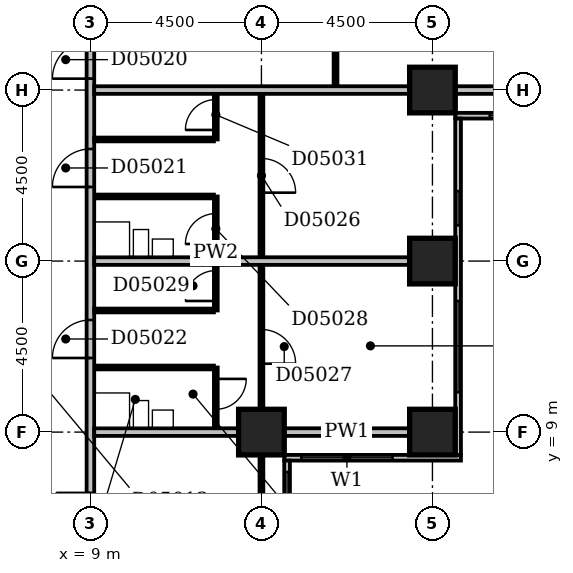
"""IFC4 building model, lengths in metres.
Left out: names, types, materials, properties, quantities, classifications, styles, units other than length and angle.
Written with IfcOpenShell. Run it as: python <this file> out.ifc"""

import sys

from ifc_helpers import new_model, si_unit, direction, frame, frame_2d, origin, origin_2d, place, context, subcontext, project, spatial, rectangle, extrude, element, fill, save


model = new_model("IFC4")
c1 = context("Model", 3, precision=1e-05, world=origin(), true_north=direction((0.0, 1.0)))
c2 = subcontext(c1, "Body", "Model", "MODEL_VIEW")
j1 = project(units=[si_unit("LENGTHUNIT", "METRE"), si_unit("PLANEANGLEUNIT", "RADIAN")], contexts=[c1])
p1 = place(None, origin())
s1 = spatial("IfcSite", under=j1, at=p1, CompositionType="ELEMENT")
p2 = place(p1, origin())
s2 = spatial("IfcBuilding", under=s1, at=p2, CompositionType="ELEMENT")
p3 = place(p2, frame((0.0, 0.0, 29.0)))
s3 = spatial("IfcBuildingStorey", under=s2, at=p3, CompositionType="ELEMENT", Elevation=29.0)
for number, where, z_axis, x_axis in (
    (1, (13.5, 9.0, -0.3), (0.0, 0.0, 1.0), (1.0, 0.0, 0.0)),
    (2, (18.0, 9.0, -0.3), (0.0, 0.0, 1.0), (1.0, 0.0, 0.0)),
    (3, (18.0, 13.5, -0.3), (0.0, 0.0, 1.0), (1.0, 0.0, 0.0)),
    (4, (18.0, 18.0, -0.3), (0.0, 0.0, 1.0), (1.0, 0.0, 0.0)),
):
    element("IfcColumn", number, at=place(p3, frame(where, z_axis=z_axis, x_axis=x_axis)), inside=s3, PredefinedType="COLUMN", context=c2, shape_type="SweptSolid", body=[
        extrude(rectangle(XDim=1.2, YDim=1.2, at=origin_2d()), origin(), (0.0, 0.0, 1.0), 3.6),
    ])
p4 = place(p3, frame((14.175, 3.9, 0.0), z_axis=(0.0, 0.0, 1.0), x_axis=(0.0, 1.0, 0.0)))
e5 = element("IfcWall", 5, at=p4, inside=s3, PredefinedType="STANDARD", context=c2, shape_type="SweptSolid", body=[
    extrude(rectangle(XDim=4.35, YDim=0.15, at=frame_2d((2.175, 0.0))), origin(), (0.0, 0.0, 1.0), 2.7),
])
p5 = place(p4, frame((1.65, 0.0, 0.6)))
e6 = element("IfcOpeningElement", 6, at=p5, cuts=e5, PredefinedType="OPENING", context=c2, shape_type="SweptSolid", body=[
    extrude(rectangle(XDim=2.4, YDim=1.8, at=frame_2d((1.2, 0.9))), frame((0.0, 0.087, 0.0), z_axis=(0.0, -1.0, 0.0), x_axis=(1.0, 0.0, 0.0)), (0.0, 0.0, 1.0), 0.174),
])
p6 = place(p3, frame((14.1, 8.325, 0.0), z_axis=(0.0, 0.0, 1.0), x_axis=(1.0, 0.0, 0.0)))
e7 = element("IfcWall", 7, at=p6, inside=s3, PredefinedType="STANDARD", context=c2, shape_type="SweptSolid", body=[
    extrude(rectangle(XDim=4.65, YDim=0.15, at=frame_2d((2.325, 0.0))), origin(), (0.0, 0.0, 1.0), 2.7),
])
p7 = place(p6, frame((0.45, 0.0, 0.6)))
e8 = element("IfcOpeningElement", 8, at=p7, cuts=e7, PredefinedType="OPENING", context=c2, shape_type="SweptSolid", body=[
    extrude(rectangle(XDim=2.4, YDim=1.8, at=frame_2d((1.2, 0.9))), frame((0.0, 0.087, 0.0), z_axis=(0.0, -1.0, 0.0), x_axis=(1.0, 0.0, 0.0)), (0.0, 0.0, 1.0), 0.174),
])
p8 = place(p3, frame((18.675, 8.4, 0.0), z_axis=(0.0, 0.0, 1.0), x_axis=(0.0, 1.0, 0.0)))
e9 = element("IfcWall", 9, at=p8, inside=s3, PredefinedType="STANDARD", context=c2, shape_type="SweptSolid", body=[
    extrude(rectangle(XDim=8.85, YDim=0.15, at=frame_2d((4.425, 0.0))), origin(), (0.0, 0.0, 1.0), 2.7),
])
p9 = place(p8, frame((1.65, 0.0, 0.6)))
e10 = element("IfcOpeningElement", 10, at=p9, cuts=e9, PredefinedType="OPENING", context=c2, shape_type="SweptSolid", body=[
    extrude(rectangle(XDim=2.4, YDim=1.8, at=frame_2d((1.2, 0.9))), frame((0.0, 0.087, 0.0), z_axis=(0.0, -1.0, 0.0), x_axis=(1.0, 0.0, 0.0)), (0.0, 0.0, 1.0), 0.174),
])
p10 = place(p8, frame((6.04, 0.0, 0.6)))
e11 = element("IfcOpeningElement", 11, at=p10, cuts=e9, PredefinedType="OPENING", context=c2, shape_type="SweptSolid", body=[
    extrude(rectangle(XDim=0.9, YDim=1.8, at=frame_2d((0.45, 0.9))), frame((0.0, 0.087, 0.0), z_axis=(0.0, -1.0, 0.0), x_axis=(1.0, 0.0, 0.0)), (0.0, 0.0, 1.0), 0.174),
])
p11 = place(p3, frame((18.6, 17.325, 0.0), z_axis=(0.0, 0.0, 1.0), x_axis=(1.0, 0.0, 0.0)))
e12 = element("IfcWall", 12, at=p11, inside=s3, PredefinedType="STANDARD", context=c2, shape_type="SweptSolid", body=[
    extrude(rectangle(XDim=4.65, YDim=0.15, at=frame_2d((2.325, 0.0))), origin(), (0.0, 0.0, 1.0), 2.7),
])
p12 = place(p11, frame((0.907, 0.0, 0.6)))
e13 = element("IfcOpeningElement", 13, at=p12, cuts=e12, PredefinedType="OPENING", context=c2, shape_type="SweptSolid", body=[
    extrude(rectangle(XDim=2.1, YDim=1.8, at=frame_2d((1.05, 0.9))), frame((0.0, 0.087, 0.0), z_axis=(0.0, -1.0, 0.0), x_axis=(1.0, 0.0, 0.0)), (0.0, 0.0, 1.0), 0.174),
])
p13 = place(p3, frame((9.0, 5.0, 0.0), z_axis=(0.0, 0.0, 1.0), x_axis=(0.0, 1.0, 0.0)))
e14 = element("IfcWall", 14, at=p13, inside=s3, PredefinedType="PARTITIONING", context=c2, shape_type="SweptSolid", body=[
    extrude(rectangle(XDim=44.5, YDim=0.2, at=frame_2d((22.25, 0.0))), origin(), (0.0, 0.0, 1.0), 3.3),
])
p14 = place(p13, frame((24.7, 0.0, 0.0)))
e15 = element("IfcOpeningElement", 15, at=p14, cuts=e14, PredefinedType="OPENING", context=c2, shape_type="SweptSolid", body=[
    extrude(rectangle(XDim=1.0, YDim=2.1, at=frame_2d((0.5, 1.05))), frame((0.0, 0.112, 0.0), z_axis=(0.0, -1.0, 0.0), x_axis=(1.0, 0.0, 0.0)), (0.0, 0.0, 1.0), 0.224),
])
p15 = place(p13, frame((13.3, 0.0, 0.0)))
e16 = element("IfcOpeningElement", 16, at=p15, cuts=e14, PredefinedType="OPENING", context=c2, shape_type="SweptSolid", body=[
    extrude(rectangle(XDim=1.0, YDim=2.1, at=frame_2d((0.5, 1.05))), frame((0.0, 0.112, 0.0), z_axis=(0.0, -1.0, 0.0), x_axis=(1.0, 0.0, 0.0)), (0.0, 0.0, 1.0), 0.224),
])
p16 = place(p13, frame((10.45, 0.0, 0.0)))
e17 = element("IfcOpeningElement", 17, at=p16, cuts=e14, PredefinedType="OPENING", context=c2, shape_type="SweptSolid", body=[
    extrude(rectangle(XDim=1.0, YDim=2.1, at=frame_2d((0.5, 1.05))), frame((0.0, 0.112, 0.0), z_axis=(0.0, -1.0, 0.0), x_axis=(1.0, 0.0, 0.0)), (0.0, 0.0, 1.0), 0.224),
])
p17 = place(p13, frame((5.95, 0.0, 0.0)))
e18 = element("IfcOpeningElement", 18, at=p17, cuts=e14, PredefinedType="OPENING", context=c2, shape_type="SweptSolid", body=[
    extrude(rectangle(XDim=1.0, YDim=2.1, at=frame_2d((0.5, 1.05))), frame((0.0, 0.112, 0.0), z_axis=(0.0, -1.0, 0.0), x_axis=(1.0, 0.0, 0.0)), (0.0, 0.0, 1.0), 0.224),
])
p18 = place(p13, frame((37.25, 0.0, 0.0)))
e19 = element("IfcOpeningElement", 19, at=p18, cuts=e14, PredefinedType="OPENING", context=c2, shape_type="SweptSolid", body=[
    extrude(rectangle(XDim=0.9, YDim=2.1, at=frame_2d((0.45, 1.05))), frame((0.0, 0.112, 0.0), z_axis=(0.0, -1.0, 0.0), x_axis=(1.0, 0.0, 0.0)), (0.0, 0.0, 1.0), 0.224),
])
p19 = place(p13, frame((1.5, 0.0, 0.0)))
e20 = element("IfcOpeningElement", 20, at=p19, cuts=e14, PredefinedType="OPENING", context=c2, shape_type="SweptSolid", body=[
    extrude(rectangle(XDim=0.9, YDim=2.1, at=frame_2d((0.45, 1.05))), frame((0.0, 0.112, 0.0), z_axis=(0.0, -1.0, 0.0), x_axis=(1.0, 0.0, 0.0)), (0.0, 0.0, 1.0), 0.224),
])
p20 = place(p3, frame((13.5, 5.1, 0.0), z_axis=(0.0, 0.0, 1.0), x_axis=(0.0, 1.0, 0.0)))
e21 = element("IfcWall", 21, at=p20, inside=s3, PredefinedType="PARTITIONING", context=c2, shape_type="SweptSolid", body=[
    extrude(rectangle(XDim=3.3, YDim=0.1, at=frame_2d((1.65, 0.0))), origin(), (0.0, 0.0, 1.0), 2.7),
])
p21 = place(p3, frame((9.1, 9.0, 0.0), z_axis=(0.0, 0.0, 1.0), x_axis=(1.0, 0.0, 0.0)))
e22 = element("IfcWall", 22, at=p21, inside=s3, PredefinedType="PARTITIONING", context=c2, shape_type="SweptSolid", body=[
    extrude(rectangle(XDim=3.8, YDim=0.2, at=frame_2d((1.9, 0.0))), origin(), (0.0, 0.0, 1.0), 3.3),
])
p22 = place(p3, frame((14.1, 9.0, 0.0), z_axis=(0.0, 0.0, 1.0), x_axis=(1.0, 0.0, 0.0)))
e23 = element("IfcWall", 23, at=p22, inside=s3, PredefinedType="PARTITIONING", context=c2, shape_type="SweptSolid", body=[
    extrude(rectangle(XDim=3.3, YDim=0.2, at=frame_2d((1.65, 0.0))), origin(), (0.0, 0.0, 1.0), 2.7),
])
p23 = place(p3, frame((12.3, 9.1, 0.0), z_axis=(0.0, 0.0, 1.0), x_axis=(0.0, 1.0, 0.0)))
e24 = element("IfcWall", 24, at=p23, inside=s3, PredefinedType="PARTITIONING", context=c2, shape_type="SweptSolid", body=[
    extrude(rectangle(XDim=1.6, YDim=0.1, at=frame_2d((0.8, 0.0))), origin(), (0.0, 0.0, 1.0), 3.3),
])
p24 = place(p23, frame((0.5, 0.0, 0.0)))
e25 = element("IfcOpeningElement", 25, at=p24, cuts=e24, PredefinedType="OPENING", context=c2, shape_type="SweptSolid", body=[
    extrude(rectangle(XDim=0.8, YDim=2.1, at=frame_2d((0.4, 1.05))), frame((0.0, 0.062, 0.0), z_axis=(0.0, -1.0, 0.0), x_axis=(1.0, 0.0, 0.0)), (0.0, 0.0, 1.0), 0.124),
])
p25 = place(p3, frame((13.5, 9.6, 0.0), z_axis=(0.0, 0.0, 1.0), x_axis=(0.0, 1.0, 0.0)))
e26 = element("IfcWall", 26, at=p25, inside=s3, PredefinedType="PARTITIONING", context=c2, shape_type="SweptSolid", body=[
    extrude(rectangle(XDim=8.3, YDim=0.1, at=frame_2d((4.15, 0.0))), origin(), (0.0, 0.0, 1.0), 3.3),
])
p26 = place(p25, frame((5.7, 0.0, 0.0)))
e27 = element("IfcOpeningElement", 27, at=p26, cuts=e26, PredefinedType="OPENING", context=c2, shape_type="SweptSolid", body=[
    extrude(rectangle(XDim=0.9, YDim=2.1, at=frame_2d((0.45, 1.05))), frame((0.0, 0.062, 0.0), z_axis=(0.0, -1.0, 0.0), x_axis=(1.0, 0.0, 0.0)), (0.0, 0.0, 1.0), 0.124),
])
p27 = place(p25, frame((1.2, 0.0, 0.0)))
e28 = element("IfcOpeningElement", 28, at=p27, cuts=e26, PredefinedType="OPENING", context=c2, shape_type="SweptSolid", body=[
    extrude(rectangle(XDim=0.9, YDim=2.1, at=frame_2d((0.45, 1.05))), frame((0.0, 0.062, 0.0), z_axis=(0.0, -1.0, 0.0), x_axis=(1.0, 0.0, 0.0)), (0.0, 0.0, 1.0), 0.124),
])
p28 = place(p3, frame((9.1, 10.7, 0.0), z_axis=(0.0, 0.0, 1.0), x_axis=(1.0, 0.0, 0.0)))
e29 = element("IfcWall", 29, at=p28, inside=s3, PredefinedType="PLUMBINGWALL", context=c2, shape_type="SweptSolid", body=[
    extrude(rectangle(XDim=3.15, YDim=0.1, at=frame_2d((1.575, 0.0))), origin(), (0.0, 0.0, 1.0), 3.3),
])
p29 = place(p3, frame((9.1, 12.2, 0.0), z_axis=(0.0, 0.0, 1.0), x_axis=(1.0, 0.0, 0.0)))
e30 = element("IfcWall", 30, at=p29, inside=s3, PredefinedType="PARTITIONING", context=c2, shape_type="SweptSolid", body=[
    extrude(rectangle(XDim=3.15, YDim=0.1, at=frame_2d((1.575, 0.0))), origin(), (0.0, 0.0, 1.0), 3.3),
])
p30 = place(p3, frame((12.3, 12.2, 0.0), z_axis=(0.0, 0.0, 1.0), x_axis=(0.0, 1.0, 0.0)))
e31 = element("IfcWall", 31, at=p30, inside=s3, PredefinedType="PARTITIONING", context=c2, shape_type="SweptSolid", body=[
    extrude(rectangle(XDim=3.0, YDim=0.1, at=frame_2d((1.5, 0.0))), origin(), (0.0, 0.0, 1.0), 3.3),
])
p31 = place(p30, frame((1.75, 0.0, 0.0)))
e32 = element("IfcOpeningElement", 32, at=p31, cuts=e31, PredefinedType="OPENING", context=c2, shape_type="SweptSolid", body=[
    extrude(rectangle(XDim=0.8, YDim=2.1, at=frame_2d((0.4, 1.05))), frame((0.0, 0.062, 0.0), z_axis=(0.0, -1.0, 0.0), x_axis=(1.0, 0.0, 0.0)), (0.0, 0.0, 1.0), 0.124),
])
p32 = place(p30, frame((0.25, 0.0, 0.0)))
e33 = element("IfcOpeningElement", 33, at=p32, cuts=e31, PredefinedType="OPENING", context=c2, shape_type="SweptSolid", body=[
    extrude(rectangle(XDim=0.8, YDim=2.1, at=frame_2d((0.4, 1.05))), frame((0.0, 0.062, 0.0), z_axis=(0.0, -1.0, 0.0), x_axis=(1.0, 0.0, 0.0)), (0.0, 0.0, 1.0), 0.124),
])
p33 = place(p3, frame((9.1, 13.5, 0.0), z_axis=(0.0, 0.0, 1.0), x_axis=(1.0, 0.0, 0.0)))
e34 = element("IfcWall", 34, at=p33, inside=s3, PredefinedType="PARTITIONING", context=c2, shape_type="SweptSolid", body=[
    extrude(rectangle(XDim=8.3, YDim=0.2, at=frame_2d((4.15, 0.0))), origin(), (0.0, 0.0, 1.0), 3.3),
])
p34 = place(p3, frame((9.1, 15.2, 0.0), z_axis=(0.0, 0.0, 1.0), x_axis=(1.0, 0.0, 0.0)))
e35 = element("IfcWall", 35, at=p34, inside=s3, PredefinedType="PLUMBINGWALL", context=c2, shape_type="SweptSolid", body=[
    extrude(rectangle(XDim=3.15, YDim=0.1, at=frame_2d((1.575, 0.0))), origin(), (0.0, 0.0, 1.0), 3.3),
])
p35 = place(p3, frame((9.1, 16.7, 0.0), z_axis=(0.0, 0.0, 1.0), x_axis=(1.0, 0.0, 0.0)))
e36 = element("IfcWall", 36, at=p35, inside=s3, PredefinedType="PARTITIONING", context=c2, shape_type="SweptSolid", body=[
    extrude(rectangle(XDim=3.15, YDim=0.1, at=frame_2d((1.575, 0.0))), origin(), (0.0, 0.0, 1.0), 3.3),
])
p36 = place(p3, frame((12.3, 16.7, 0.0), z_axis=(0.0, 0.0, 1.0), x_axis=(0.0, 1.0, 0.0)))
e37 = element("IfcWall", 37, at=p36, inside=s3, PredefinedType="PARTITIONING", context=c2, shape_type="SweptSolid", body=[
    extrude(rectangle(XDim=1.2, YDim=0.1, at=frame_2d((0.6, 0.0))), origin(), (0.0, 0.0, 1.0), 3.3),
])
p37 = place(p36, frame((0.25, 0.0, 0.0)))
e38 = element("IfcOpeningElement", 38, at=p37, cuts=e37, PredefinedType="OPENING", context=c2, shape_type="SweptSolid", body=[
    extrude(rectangle(XDim=0.8, YDim=2.1, at=frame_2d((0.4, 1.05))), frame((0.0, 0.062, 0.0), z_axis=(0.0, -1.0, 0.0), x_axis=(1.0, 0.0, 0.0)), (0.0, 0.0, 1.0), 0.124),
])
p38 = place(p3, frame((9.1, 18.0, 0.0), z_axis=(0.0, 0.0, 1.0), x_axis=(1.0, 0.0, 0.0)))
e39 = element("IfcWall", 39, at=p38, inside=s3, PredefinedType="PARTITIONING", context=c2, shape_type="SweptSolid", body=[
    extrude(rectangle(XDim=8.3, YDim=0.2, at=frame_2d((4.15, 0.0))), origin(), (0.0, 0.0, 1.0), 2.6),
])
p39 = place(p3, frame((18.6, 18.0, 0.0), z_axis=(0.0, 0.0, 1.0), x_axis=(1.0, 0.0, 0.0)))
e40 = element("IfcWall", 40, at=p39, inside=s3, PredefinedType="PARTITIONING", context=c2, shape_type="SweptSolid", body=[
    extrude(rectangle(XDim=3.3, YDim=0.2, at=frame_2d((1.65, 0.0))), origin(), (0.0, 0.0, 1.0), 2.7),
])
p40 = place(p3, frame((15.45, 18.1, 0.0), z_axis=(0.0, 0.0, 1.0), x_axis=(0.0, 1.0, 0.0)))
e41 = element("IfcWall", 41, at=p40, inside=s3, PredefinedType="PARTITIONING", context=c2, shape_type="SweptSolid", body=[
    extrude(rectangle(XDim=8.8, YDim=0.1, at=frame_2d((4.4, 0.0))), origin(), (0.0, 0.0, 1.0), 3.3),
])
p41 = place(p40, frame((1.7, 0.0, 0.0)))
e42 = element("IfcOpeningElement", 42, at=p41, cuts=e41, PredefinedType="OPENING", context=c2, shape_type="SweptSolid", body=[
    extrude(rectangle(XDim=0.9, YDim=2.1, at=frame_2d((0.45, 1.05))), frame((0.0, 0.062, 0.0), z_axis=(0.0, -1.0, 0.0), x_axis=(1.0, 0.0, 0.0)), (0.0, 0.0, 1.0), 0.124),
])
p42 = place(p40, frame((6.2, 0.0, 0.0)))
e43 = element("IfcOpeningElement", 43, at=p42, cuts=e41, PredefinedType="OPENING", context=c2, shape_type="SweptSolid", body=[
    extrude(rectangle(XDim=0.9, YDim=2.1, at=frame_2d((0.45, 1.05))), frame((0.0, 0.062, 0.0), z_axis=(0.0, -1.0, 0.0), x_axis=(1.0, 0.0, 0.0)), (0.0, 0.0, 1.0), 0.124),
])
p43 = place(p5, origin())
e44 = element("IfcWindow", 44, at=p43, inside=s3, PartitioningType="SINGLE_PANEL", PredefinedType="WINDOW", context=c2, shape_type="SweptSolid", body=[
    extrude(rectangle(XDim=2.4, YDim=1.8, at=frame_2d((1.2, 0.9))), frame((0.0, 0.03, 0.0), z_axis=(0.0, -1.0, 0.0), x_axis=(1.0, 0.0, 0.0)), (0.0, 0.0, 1.0), 0.06),
])
fill(e6, e44)
p44 = place(p7, origin())
e45 = element("IfcWindow", 45, at=p44, inside=s3, PartitioningType="SINGLE_PANEL", PredefinedType="WINDOW", context=c2, shape_type="SweptSolid", body=[
    extrude(rectangle(XDim=2.4, YDim=1.8, at=frame_2d((1.2, 0.9))), frame((0.0, 0.03, 0.0), z_axis=(0.0, -1.0, 0.0), x_axis=(1.0, 0.0, 0.0)), (0.0, 0.0, 1.0), 0.06),
])
fill(e8, e45)
p45 = place(p9, origin())
e46 = element("IfcWindow", 46, at=p45, inside=s3, PartitioningType="SINGLE_PANEL", PredefinedType="WINDOW", context=c2, shape_type="SweptSolid", body=[
    extrude(rectangle(XDim=2.4, YDim=1.8, at=frame_2d((1.2, 0.9))), frame((0.0, 0.03, 0.0), z_axis=(0.0, -1.0, 0.0), x_axis=(1.0, 0.0, 0.0)), (0.0, 0.0, 1.0), 0.06),
])
fill(e10, e46)
p46 = place(p10, origin())
e47 = element("IfcWindow", 47, at=p46, inside=s3, PartitioningType="SINGLE_PANEL", PredefinedType="WINDOW", context=c2, shape_type="SweptSolid", body=[
    extrude(rectangle(XDim=0.9, YDim=1.8, at=frame_2d((0.45, 0.9))), frame((0.0, 0.03, 0.0), z_axis=(0.0, -1.0, 0.0), x_axis=(1.0, 0.0, 0.0)), (0.0, 0.0, 1.0), 0.06),
])
fill(e11, e47)
p47 = place(p12, origin())
e48 = element("IfcWindow", 48, at=p47, inside=s3, PartitioningType="SINGLE_PANEL", PredefinedType="WINDOW", context=c2, shape_type="SweptSolid", body=[
    extrude(rectangle(XDim=2.1, YDim=1.8, at=frame_2d((1.05, 0.9))), frame((0.0, 0.03, 0.0), z_axis=(0.0, -1.0, 0.0), x_axis=(1.0, 0.0, 0.0)), (0.0, 0.0, 1.0), 0.06),
])
fill(e13, e48)
p48 = place(p15, origin())
e49 = element("IfcDoor", 49, at=p48, inside=s3, OperationType="SINGLE_SWING_LEFT", PredefinedType="DOOR", context=c2, shape_type="SweptSolid", body=[
    extrude(rectangle(XDim=1.0, YDim=2.1, at=frame_2d((0.5, 1.05))), frame((0.0, 0.025, 0.0), z_axis=(0.0, -1.0, 0.0), x_axis=(1.0, 0.0, 0.0)), (0.0, 0.0, 1.0), 0.05),
])
fill(e16, e49)
p49 = place(p16, origin())
e50 = element("IfcDoor", 50, at=p49, inside=s3, OperationType="SINGLE_SWING_LEFT", PredefinedType="DOOR", context=c2, shape_type="SweptSolid", body=[
    extrude(rectangle(XDim=1.0, YDim=2.1, at=frame_2d((0.5, 1.05))), frame((0.0, 0.025, 0.0), z_axis=(0.0, -1.0, 0.0), x_axis=(1.0, 0.0, 0.0)), (0.0, 0.0, 1.0), 0.05),
])
fill(e17, e50)
p50 = place(p17, origin())
e51 = element("IfcDoor", 51, at=p50, inside=s3, OperationType="SINGLE_SWING_LEFT", PredefinedType="DOOR", context=c2, shape_type="SweptSolid", body=[
    extrude(rectangle(XDim=1.0, YDim=2.1, at=frame_2d((0.5, 1.05))), frame((0.0, 0.025, 0.0), z_axis=(0.0, -1.0, 0.0), x_axis=(1.0, 0.0, 0.0)), (0.0, 0.0, 1.0), 0.05),
])
fill(e18, e51)
p51 = place(p24, origin())
e52 = element("IfcDoor", 52, at=p51, inside=s3, OperationType="SINGLE_SWING_RIGHT", PredefinedType="DOOR", context=c2, shape_type="SweptSolid", body=[
    extrude(rectangle(XDim=0.8, YDim=2.1, at=frame_2d((0.4, 1.05))), frame((0.0, 0.025, 0.0), z_axis=(0.0, -1.0, 0.0), x_axis=(1.0, 0.0, 0.0)), (0.0, 0.0, 1.0), 0.05),
])
fill(e25, e52)
p52 = place(p26, frame((0.9, 0.0, 0.0), z_axis=(0.0, 0.0, 1.0), x_axis=(-1.0, 0.0, 0.0)))
e53 = element("IfcDoor", 53, at=p52, inside=s3, OperationType="SINGLE_SWING_RIGHT", PredefinedType="DOOR", context=c2, shape_type="SweptSolid", body=[
    extrude(rectangle(XDim=0.9, YDim=2.1, at=frame_2d((0.45, 1.05))), frame((0.0, 0.025, 0.0), z_axis=(0.0, -1.0, 0.0), x_axis=(1.0, 0.0, 0.0)), (0.0, 0.0, 1.0), 0.05),
])
fill(e27, e53)
p53 = place(p27, frame((0.9, 0.0, 0.0), z_axis=(0.0, 0.0, 1.0), x_axis=(-1.0, 0.0, 0.0)))
e54 = element("IfcDoor", 54, at=p53, inside=s3, OperationType="SINGLE_SWING_RIGHT", PredefinedType="DOOR", context=c2, shape_type="SweptSolid", body=[
    extrude(rectangle(XDim=0.9, YDim=2.1, at=frame_2d((0.45, 1.05))), frame((0.0, 0.025, 0.0), z_axis=(0.0, -1.0, 0.0), x_axis=(1.0, 0.0, 0.0)), (0.0, 0.0, 1.0), 0.05),
])
fill(e28, e54)
p54 = place(p31, origin())
e55 = element("IfcDoor", 55, at=p54, inside=s3, OperationType="SINGLE_SWING_LEFT", PredefinedType="DOOR", context=c2, shape_type="SweptSolid", body=[
    extrude(rectangle(XDim=0.8, YDim=2.1, at=frame_2d((0.4, 1.05))), frame((0.0, 0.025, 0.0), z_axis=(0.0, -1.0, 0.0), x_axis=(1.0, 0.0, 0.0)), (0.0, 0.0, 1.0), 0.05),
])
fill(e32, e55)
p55 = place(p32, origin())
e56 = element("IfcDoor", 56, at=p55, inside=s3, OperationType="SINGLE_SWING_LEFT", PredefinedType="DOOR", context=c2, shape_type="SweptSolid", body=[
    extrude(rectangle(XDim=0.8, YDim=2.1, at=frame_2d((0.4, 1.05))), frame((0.0, 0.025, 0.0), z_axis=(0.0, -1.0, 0.0), x_axis=(1.0, 0.0, 0.0)), (0.0, 0.0, 1.0), 0.05),
])
fill(e33, e56)
p56 = place(p37, origin())
e57 = element("IfcDoor", 57, at=p56, inside=s3, OperationType="SINGLE_SWING_LEFT", PredefinedType="DOOR", context=c2, shape_type="SweptSolid", body=[
    extrude(rectangle(XDim=0.8, YDim=2.1, at=frame_2d((0.4, 1.05))), frame((0.0, 0.025, 0.0), z_axis=(0.0, -1.0, 0.0), x_axis=(1.0, 0.0, 0.0)), (0.0, 0.0, 1.0), 0.05),
])
fill(e38, e57)
save(model, sys.argv[1])
